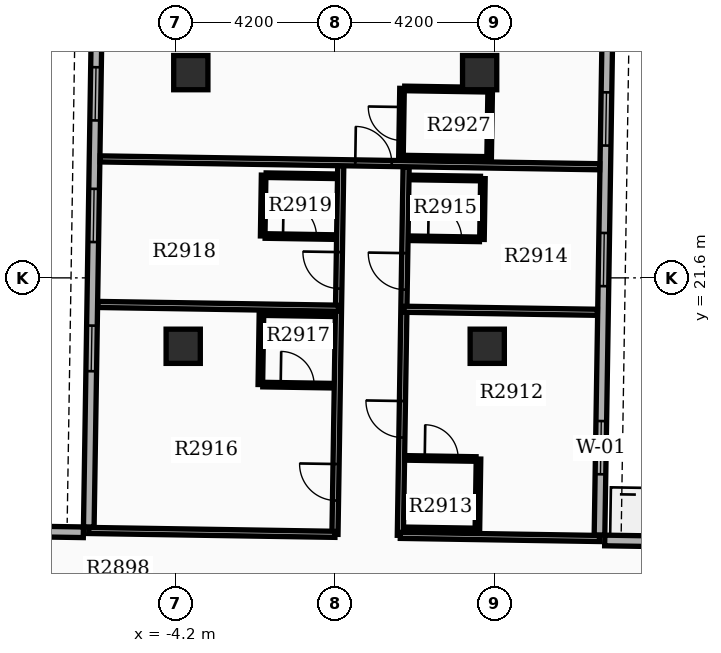
"""IFC4 building model, lengths in metres.
Left out: names, types, materials, properties, quantities, classifications, styles, units other than length and angle.
Written with IfcOpenShell. Run it as: python <this file> out.ifc"""

import sys

from ifc_helpers import new_model, si_unit, direction, frame, frame_2d, origin, origin_2d, place, context, subcontext, project, spatial, rectangle, extrude, element, fill, save


model = new_model("IFC4")
c1 = context("Model", 3, precision=1e-05, world=origin(), true_north=direction((0.0, 1.0)))
c2 = subcontext(c1, "Body", "Model", "MODEL_VIEW")
j1 = project(units=[si_unit("LENGTHUNIT", "METRE"), si_unit("PLANEANGLEUNIT", "RADIAN")], contexts=[c1])
p1 = place(None, origin())
s1 = spatial("IfcSite", under=j1, at=p1, CompositionType="ELEMENT")
p2 = place(p1, origin())
s2 = spatial("IfcBuilding", under=s1, at=p2, CompositionType="ELEMENT")
p3 = place(p2, frame((0.0, 0.0, 180.0)))
s3 = spatial("IfcBuildingStorey", under=s2, at=p3, CompositionType="ELEMENT", Elevation=180.0)
for number, where, z_axis, x_axis in (
    (1, (-4.0, 19.8, 0.0), (0.0, 0.0, 1.0), (1.0, 0.0, 0.0)),
    (2, (4.0, 19.8, 0.0), (0.0, 0.0, 1.0), (1.0, 0.0, 0.0)),
    (3, (-3.8, 27.0, 0.0), (0.0, 0.0, 1.0), (1.0, 0.0, 0.0)),
    (4, (3.8, 27.0, 0.0), (0.0, 0.0, 1.0), (1.0, 0.0, 0.0)),
):
    element("IfcColumn", number, at=place(p3, frame(where, z_axis=z_axis, x_axis=x_axis)), inside=s3, PredefinedType="COLUMN", context=c2, shape_type="SweptSolid", body=[
        extrude(rectangle(XDim=0.9, YDim=0.9, at=origin_2d()), origin(), (0.0, 0.0, 1.0), 3.9),
    ])
p4 = place(p3, frame((6.954, 14.833, 0.0), z_axis=(0.0, 0.0, 1.0), x_axis=(0.015705059908, 0.999876667941, 0.0)))
e5 = element("IfcWall", 5, at=p4, inside=s3, PredefinedType="STANDARD", context=c2, shape_type="SweptSolid", body=[
    extrude(rectangle(XDim=20.1, YDim=0.28, at=frame_2d((10.05, 0.0))), origin(), (0.0, 0.0, 1.0), 2.97),
])
p5 = place(p4, frame((1.6, 0.0, 0.8)))
e6 = element("IfcOpeningElement", 6, at=p5, cuts=e5, PredefinedType="OPENING", context=c2, shape_type="SweptSolid", body=[
    extrude(rectangle(XDim=1.4, YDim=1.6, at=frame_2d((0.7, 0.8))), frame((0.0, 0.15, 0.0), z_axis=(0.0, -1.0, 0.0), x_axis=(1.0, 0.0, 0.0)), (0.0, 0.0, 1.0), 0.3),
])
p6 = place(p4, frame((6.55, 0.0, 0.8)))
e7 = element("IfcOpeningElement", 7, at=p6, cuts=e5, PredefinedType="OPENING", context=c2, shape_type="SweptSolid", body=[
    extrude(rectangle(XDim=1.4, YDim=1.6, at=frame_2d((0.7, 0.8))), frame((0.0, 0.15, 0.0), z_axis=(0.0, -1.0, 0.0), x_axis=(1.0, 0.0, 0.0)), (0.0, 0.0, 1.0), 0.3),
])
p7 = place(p4, frame((10.25, 0.0, 0.8)))
e8 = element("IfcOpeningElement", 8, at=p7, cuts=e5, PredefinedType="OPENING", context=c2, shape_type="SweptSolid", body=[
    extrude(rectangle(XDim=1.4, YDim=1.6, at=frame_2d((0.7, 0.8))), frame((0.0, 0.15, 0.0), z_axis=(0.0, -1.0, 0.0), x_axis=(1.0, 0.0, 0.0)), (0.0, 0.0, 1.0), 0.3),
])
p8 = place(p4, frame((13.45, 0.0, 0.8)))
e9 = element("IfcOpeningElement", 9, at=p8, cuts=e5, PredefinedType="OPENING", context=c2, shape_type="SweptSolid", body=[
    extrude(rectangle(XDim=1.4, YDim=1.6, at=frame_2d((0.7, 0.8))), frame((0.0, 0.15, 0.0), z_axis=(0.0, -1.0, 0.0), x_axis=(1.0, 0.0, 0.0)), (0.0, 0.0, 1.0), 0.3),
])
p9 = place(p3, frame((-6.169, 35.141, 0.0), z_axis=(0.0, 0.0, 1.0), x_axis=(-0.01571739401, -0.999876474133, 0.0)))
e10 = element("IfcWall", 10, at=p9, inside=s3, PredefinedType="STANDARD", context=c2, shape_type="SweptSolid", body=[
    extrude(rectangle(XDim=20.1, YDim=0.28, at=frame_2d((10.05, 0.0))), origin(), (0.0, 0.0, 1.0), 2.97),
])
p10 = place(p9, frame((1.6, 0.0, 0.8)))
e11 = element("IfcOpeningElement", 11, at=p10, cuts=e10, PredefinedType="OPENING", context=c2, shape_type="SweptSolid", body=[
    extrude(rectangle(XDim=1.4, YDim=1.6, at=frame_2d((0.7, 0.8))), frame((0.0, 0.15, 0.0), z_axis=(0.0, -1.0, 0.0), x_axis=(1.0, 0.0, 0.0)), (0.0, 0.0, 1.0), 0.3),
])
p11 = place(p9, frame((4.8, 0.0, 0.8)))
e12 = element("IfcOpeningElement", 12, at=p11, cuts=e10, PredefinedType="OPENING", context=c2, shape_type="SweptSolid", body=[
    extrude(rectangle(XDim=1.4, YDim=1.6, at=frame_2d((0.7, 0.8))), frame((0.0, 0.15, 0.0), z_axis=(0.0, -1.0, 0.0), x_axis=(1.0, 0.0, 0.0)), (0.0, 0.0, 1.0), 0.3),
])
p12 = place(p9, frame((8.0, 0.0, 0.8)))
e13 = element("IfcOpeningElement", 13, at=p12, cuts=e10, PredefinedType="OPENING", context=c2, shape_type="SweptSolid", body=[
    extrude(rectangle(XDim=1.4, YDim=1.6, at=frame_2d((0.7, 0.8))), frame((0.0, 0.15, 0.0), z_axis=(0.0, -1.0, 0.0), x_axis=(1.0, 0.0, 0.0)), (0.0, 0.0, 1.0), 0.3),
])
p13 = place(p9, frame((11.2, 0.0, 0.8)))
e14 = element("IfcOpeningElement", 14, at=p13, cuts=e10, PredefinedType="OPENING", context=c2, shape_type="SweptSolid", body=[
    extrude(rectangle(XDim=1.4, YDim=1.6, at=frame_2d((0.7, 0.8))), frame((0.0, 0.15, 0.0), z_axis=(0.0, -1.0, 0.0), x_axis=(1.0, 0.0, 0.0)), (0.0, 0.0, 1.0), 0.3),
])
p14 = place(p9, frame((14.799, 0.0, 0.85)))
e15 = element("IfcOpeningElement", 15, at=p14, cuts=e10, PredefinedType="OPENING", context=c2, shape_type="SweptSolid", body=[
    extrude(rectangle(XDim=1.2, YDim=1.6, at=frame_2d((0.6, 0.8))), frame((0.0, 0.15, 0.0), z_axis=(0.0, -1.0, 0.0), x_axis=(1.0, 0.0, 0.0)), (0.0, 0.0, 1.0), 0.3),
])
p15 = place(p3, frame((13.391, 14.592, 0.0), z_axis=(0.0, 0.0, 1.0), x_axis=(-0.999876833368, 0.015694524359, 0.0)))
e16 = element("IfcWall", 16, at=p15, inside=s3, PredefinedType="STANDARD", context=c2, shape_type="SweptSolid", body=[
    extrude(rectangle(XDim=6.3, YDim=0.28, at=frame_2d((3.15, 0.0))), origin(), (0.0, 0.0, 1.0), 2.97),
])
p16 = place(p3, frame((-12.926, 15.005, 0.0), z_axis=(0.0, 0.0, 1.0), x_axis=(0.999876823822, -0.015695132501, 0.0)))
e17 = element("IfcWall", 17, at=p16, inside=s3, PredefinedType="STANDARD", context=c2, shape_type="SweptSolid", body=[
    extrude(rectangle(XDim=6.3, YDim=0.28, at=frame_2d((3.15, 0.0))), origin(), (0.0, 0.0, 1.0), 2.97),
])
p17 = place(p3, frame((1.713, 14.825, 0.0), z_axis=(0.0, 0.0, 1.0), x_axis=(0.015705659641, 0.999876658521, 0.0)))
e18 = element("IfcWall", 18, at=p17, inside=s3, PredefinedType="PARTITIONING", context=c2, shape_type="SweptSolid", body=[
    extrude(rectangle(XDim=9.7, YDim=0.16, at=frame_2d((4.85, 0.0))), origin(), (0.0, 0.0, 1.0), 2.96),
])
p18 = place(p17, frame((2.575, 0.0, 0.0)))
e19 = element("IfcOpeningElement", 19, at=p18, cuts=e18, PredefinedType="OPENING", context=c2, shape_type="SweptSolid", body=[
    extrude(rectangle(XDim=0.96, YDim=2.15, at=frame_2d((0.48, 1.075))), frame((0.0, 0.09, 0.0), z_axis=(0.0, -1.0, 0.0), x_axis=(1.0, 0.0, 0.0)), (0.0, 0.0, 1.0), 0.18),
])
p19 = place(p17, frame((6.467, 0.0, 0.0)))
e20 = element("IfcOpeningElement", 20, at=p19, cuts=e18, PredefinedType="OPENING", context=c2, shape_type="SweptSolid", body=[
    extrude(rectangle(XDim=0.96, YDim=2.15, at=frame_2d((0.48, 1.075))), frame((0.0, 0.09, 0.0), z_axis=(0.0, -1.0, 0.0), x_axis=(1.0, 0.0, 0.0)), (0.0, 0.0, 1.0), 0.18),
])
p20 = place(p3, frame((1.713, 14.825, 0.0), z_axis=(0.0, 0.0, 1.0), x_axis=(0.99987672073, -0.015701698737, 0.0)))
e21 = element("IfcWall", 21, at=p20, inside=s3, PredefinedType="PARTITIONING", context=c2, shape_type="SweptSolid", body=[
    extrude(rectangle(XDim=5.24, YDim=0.16, at=frame_2d((2.62, 0.0))), origin(), (0.0, 0.0, 1.0), 2.96),
])
p21 = place(p3, frame((1.806, 20.774, 0.0), z_axis=(0.0, 0.0, 1.0), x_axis=(0.999876343559, -0.015725698427, 0.0)))
e22 = element("IfcWall", 22, at=p21, inside=s3, PredefinedType="PARTITIONING", context=c2, shape_type="SweptSolid", body=[
    extrude(rectangle(XDim=5.092, YDim=0.16, at=frame_2d((2.546, 0.0))), origin(), (0.0, 0.0, 1.0), 2.96),
])
p22 = place(p3, frame((1.885, 16.863, 0.0), z_axis=(0.0, 0.0, 1.0), x_axis=(0.999876836305, -0.015694337248, 0.0)))
e23 = element("IfcWall", 23, at=p22, inside=s3, PredefinedType="PARTITIONING", context=c2, shape_type="SweptSolid", body=[
    extrude(rectangle(XDim=1.82, YDim=0.12, at=frame_2d((0.91, 0.0))), origin(), (0.0, 0.0, 1.0), 2.96),
])
p23 = place(p22, frame((0.47, 0.0, 0.0)))
e24 = element("IfcOpeningElement", 24, at=p23, cuts=e23, PredefinedType="OPENING", context=c2, shape_type="SweptSolid", body=[
    extrude(rectangle(XDim=0.88, YDim=2.1, at=frame_2d((0.44, 1.05))), frame((0.0, 0.07, 0.0), z_axis=(0.0, -1.0, 0.0), x_axis=(1.0, 0.0, 0.0)), (0.0, 0.0, 1.0), 0.14),
])
p24 = place(p3, frame((1.856, 14.983, 0.0), z_axis=(0.0, 0.0, 1.0), x_axis=(0.999876803258, -0.015696442504, 0.0)))
e25 = element("IfcWall", 25, at=p24, inside=s3, PredefinedType="PARTITIONING", context=c2, shape_type="SweptSolid", body=[
    extrude(rectangle(XDim=1.82, YDim=0.12, at=frame_2d((0.91, 0.0))), origin(), (0.0, 0.0, 1.0), 2.96),
])
p25 = place(p3, frame((3.74, 14.953, 0.0), z_axis=(0.0, 0.0, 1.0), x_axis=(0.015842167482, 0.99987450499, 0.0)))
e26 = element("IfcWall", 26, at=p25, inside=s3, PredefinedType="PARTITIONING", context=c2, shape_type="SweptSolid", body=[
    extrude(rectangle(XDim=1.88, YDim=0.12, at=frame_2d((0.94, 0.0))), origin(), (0.0, 0.0, 1.0), 2.96),
])
p26 = place(p3, frame((1.976, 22.642, 0.0), z_axis=(0.0, 0.0, 1.0), x_axis=(0.999876836305, -0.015694337248, 0.0)))
e27 = element("IfcWall", 27, at=p26, inside=s3, PredefinedType="PARTITIONING", context=c2, shape_type="SweptSolid", body=[
    extrude(rectangle(XDim=1.82, YDim=0.12, at=frame_2d((0.91, 0.0))), origin(), (0.0, 0.0, 1.0), 2.96),
])
p27 = place(p26, frame((0.47, 0.0, 0.0)))
e28 = element("IfcOpeningElement", 28, at=p27, cuts=e27, PredefinedType="OPENING", context=c2, shape_type="SweptSolid", body=[
    extrude(rectangle(XDim=0.88, YDim=2.1, at=frame_2d((0.44, 1.05))), frame((0.0, 0.07, 0.0), z_axis=(0.0, -1.0, 0.0), x_axis=(1.0, 0.0, 0.0)), (0.0, 0.0, 1.0), 0.14),
])
p28 = place(p3, frame((2.001, 24.242, 0.0), z_axis=(0.0, 0.0, 1.0), x_axis=(0.999874722342, -0.015828443418, 0.0)))
e29 = element("IfcWall", 29, at=p28, inside=s3, PredefinedType="PARTITIONING", context=c2, shape_type="SweptSolid", body=[
    extrude(rectangle(XDim=1.82, YDim=0.12, at=frame_2d((0.91, 0.0))), origin(), (0.0, 0.0, 1.0), 2.96),
])
p29 = place(p3, frame((3.861, 22.612, 0.0), z_axis=(0.0, 0.0, 1.0), x_axis=(0.015716050513, 0.999876495251, 0.0)))
e30 = element("IfcWall", 30, at=p29, inside=s3, PredefinedType="PARTITIONING", context=c2, shape_type="SweptSolid", body=[
    extrude(rectangle(XDim=1.6, YDim=0.12, at=frame_2d((0.8, 0.0))), origin(), (0.0, 0.0, 1.0), 2.96),
])
p30 = place(p3, frame((-0.007, 14.852, 0.0), z_axis=(0.0, 0.0, 1.0), x_axis=(0.015680101899, 0.999877059645, 0.0)))
e31 = element("IfcWall", 31, at=p30, inside=s3, PredefinedType="PARTITIONING", context=c2, shape_type="SweptSolid", body=[
    extrude(rectangle(XDim=9.7, YDim=0.16, at=frame_2d((4.85, 0.0))), origin(), (0.0, 0.0, 1.0), 2.96),
])
p31 = place(p30, frame((0.89, 0.0, 0.0)))
e32 = element("IfcOpeningElement", 32, at=p31, cuts=e31, PredefinedType="OPENING", context=c2, shape_type="SweptSolid", body=[
    extrude(rectangle(XDim=0.96, YDim=2.15, at=frame_2d((0.48, 1.075))), frame((0.0, 0.09, 0.0), z_axis=(0.0, -1.0, 0.0), x_axis=(1.0, 0.0, 0.0)), (0.0, 0.0, 1.0), 0.18),
])
p32 = place(p30, frame((6.467, 0.0, 0.0)))
e33 = element("IfcOpeningElement", 33, at=p32, cuts=e31, PredefinedType="OPENING", context=c2, shape_type="SweptSolid", body=[
    extrude(rectangle(XDim=0.96, YDim=2.15, at=frame_2d((0.48, 1.075))), frame((0.0, 0.09, 0.0), z_axis=(0.0, -1.0, 0.0), x_axis=(1.0, 0.0, 0.0)), (0.0, 0.0, 1.0), 0.18),
])
p33 = place(p3, frame((-0.007, 14.852, 0.0), z_axis=(0.0, 0.0, 1.0), x_axis=(-0.999876577995, 0.015710785373, 0.0)))
e34 = element("IfcWall", 34, at=p33, inside=s3, PredefinedType="PARTITIONING", context=c2, shape_type="SweptSolid", body=[
    extrude(rectangle(XDim=6.48, YDim=0.16, at=frame_2d((3.24, 0.0))), origin(), (0.0, 0.0, 1.0), 2.96),
])
p34 = place(p3, frame((0.087, 20.801, 0.0), z_axis=(0.0, 0.0, 1.0), x_axis=(-0.999876857896, 0.015692961637, 0.0)))
e35 = element("IfcWall", 35, at=p34, inside=s3, PredefinedType="PARTITIONING", context=c2, shape_type="SweptSolid", body=[
    extrude(rectangle(XDim=6.332, YDim=0.16, at=frame_2d((3.166, 0.0))), origin(), (0.0, 0.0, 1.0), 2.96),
])
p35 = place(p3, frame((-1.905, 18.792, 0.0), z_axis=(0.0, 0.0, 1.0), x_axis=(0.999876836305, -0.015694337248, 0.0)))
e36 = element("IfcWall", 36, at=p35, inside=s3, PredefinedType="PARTITIONING", context=c2, shape_type="SweptSolid", body=[
    extrude(rectangle(XDim=1.82, YDim=0.12, at=frame_2d((0.91, 0.0))), origin(), (0.0, 0.0, 1.0), 2.96),
])
p36 = place(p35, frame((0.47, 0.0, 0.0)))
e37 = element("IfcOpeningElement", 37, at=p36, cuts=e36, PredefinedType="OPENING", context=c2, shape_type="SweptSolid", body=[
    extrude(rectangle(XDim=0.88, YDim=2.1, at=frame_2d((0.44, 1.05))), frame((0.0, 0.07, 0.0), z_axis=(0.0, -1.0, 0.0), x_axis=(1.0, 0.0, 0.0)), (0.0, 0.0, 1.0), 0.14),
])
p37 = place(p3, frame((-1.875, 20.672, 0.0), z_axis=(0.0, 0.0, 1.0), x_axis=(0.999874688728, -0.015830566654, 0.0)))
e38 = element("IfcWall", 38, at=p37, inside=s3, PredefinedType="PARTITIONING", context=c2, shape_type="SweptSolid", body=[
    extrude(rectangle(XDim=1.82, YDim=0.12, at=frame_2d((0.91, 0.0))), origin(), (0.0, 0.0, 1.0), 2.96),
])
p38 = place(p3, frame((-1.97, 18.793, 0.0), z_axis=(0.0, 0.0, 1.0), x_axis=(0.015842167482, 0.99987450499, 0.0)))
e39 = element("IfcWall", 39, at=p38, inside=s3, PredefinedType="PARTITIONING", context=c2, shape_type="SweptSolid", body=[
    extrude(rectangle(XDim=1.88, YDim=0.12, at=frame_2d((0.94, 0.0))), origin(), (0.0, 0.0, 1.0), 2.96),
])
p39 = place(p3, frame((-1.844, 22.702, 0.0), z_axis=(0.0, 0.0, 1.0), x_axis=(0.999874688728, -0.015830566654, 0.0)))
e40 = element("IfcWall", 40, at=p39, inside=s3, PredefinedType="PARTITIONING", context=c2, shape_type="SweptSolid", body=[
    extrude(rectangle(XDim=1.82, YDim=0.12, at=frame_2d((0.91, 0.0))), origin(), (0.0, 0.0, 1.0), 2.96),
])
p40 = place(p39, frame((0.47, 0.0, 0.0)))
e41 = element("IfcOpeningElement", 41, at=p40, cuts=e40, PredefinedType="OPENING", context=c2, shape_type="SweptSolid", body=[
    extrude(rectangle(XDim=0.88, YDim=2.1, at=frame_2d((0.44, 1.05))), frame((0.0, 0.07, 0.0), z_axis=(0.0, -1.0, 0.0), x_axis=(1.0, 0.0, 0.0)), (0.0, 0.0, 1.0), 0.14),
])
p41 = place(p3, frame((-1.819, 24.302, 0.0), z_axis=(0.0, 0.0, 1.0), x_axis=(0.999876836305, -0.015694337248, 0.0)))
e42 = element("IfcWall", 42, at=p41, inside=s3, PredefinedType="PARTITIONING", context=c2, shape_type="SweptSolid", body=[
    extrude(rectangle(XDim=1.82, YDim=0.12, at=frame_2d((0.91, 0.0))), origin(), (0.0, 0.0, 1.0), 2.96),
])
p42 = place(p3, frame((-1.909, 22.703, 0.0), z_axis=(0.0, 0.0, 1.0), x_axis=(0.015718448585, 0.999876457556, 0.0)))
e43 = element("IfcWall", 43, at=p42, inside=s3, PredefinedType="PARTITIONING", context=c2, shape_type="SweptSolid", body=[
    extrude(rectangle(XDim=1.6, YDim=0.12, at=frame_2d((0.8, 0.0))), origin(), (0.0, 0.0, 1.0), 2.96),
])
p43 = place(p3, frame((-6.184, 24.73, 0.0), z_axis=(0.0, 0.0, 1.0), x_axis=(0.999876528878, -0.015713911007, 0.0)))
e44 = element("IfcWall", 44, at=p43, inside=s3, PredefinedType="PARTITIONING", context=c2, shape_type="SweptSolid", body=[
    extrude(rectangle(XDim=13.144, YDim=0.16, at=frame_2d((6.572, 0.0))), origin(), (0.0, 0.0, 1.0), 2.96),
])
p44 = place(p43, frame((6.712, 0.0, 0.0)))
e45 = element("IfcOpeningElement", 45, at=p44, cuts=e44, PredefinedType="OPENING", context=c2, shape_type="SweptSolid", body=[
    extrude(rectangle(XDim=0.96, YDim=2.15, at=frame_2d((0.48, 1.075))), frame((0.0, 0.09, 0.0), z_axis=(0.0, -1.0, 0.0), x_axis=(1.0, 0.0, 0.0)), (0.0, 0.0, 1.0), 0.18),
])
p45 = place(p3, frame((1.729, 24.766, 0.0), z_axis=(0.0, 0.0, 1.0), x_axis=(0.015694337248, 0.999876836305, 0.0)))
e46 = element("IfcWall", 46, at=p45, inside=s3, PredefinedType="PARTITIONING", context=c2, shape_type="SweptSolid", body=[
    extrude(rectangle(XDim=1.82, YDim=0.12, at=frame_2d((0.91, 0.0))), origin(), (0.0, 0.0, 1.0), 2.96),
])
p46 = place(p45, frame((0.45, 0.0, 0.0)))
e47 = element("IfcOpeningElement", 47, at=p46, cuts=e46, PredefinedType="OPENING", context=c2, shape_type="SweptSolid", body=[
    extrude(rectangle(XDim=0.88, YDim=2.1, at=frame_2d((0.44, 1.05))), frame((0.0, 0.07, 0.0), z_axis=(0.0, -1.0, 0.0), x_axis=(1.0, 0.0, 0.0)), (0.0, 0.0, 1.0), 0.14),
])
p47 = place(p3, frame((4.049, 24.729, 0.0), z_axis=(0.0, 0.0, 1.0), x_axis=(0.015694337248, 0.999876836305, 0.0)))
e48 = element("IfcWall", 48, at=p47, inside=s3, PredefinedType="PARTITIONING", context=c2, shape_type="SweptSolid", body=[
    extrude(rectangle(XDim=1.82, YDim=0.12, at=frame_2d((0.91, 0.0))), origin(), (0.0, 0.0, 1.0), 2.96),
])
for number, where, z_axis, x_axis in (
    (49, (1.799, 24.765, 0.0), (0.0, 0.0, 1.0), (1.0, -0.016, 0.0)),
    (50, (1.828, 26.585, 0.0), (0.0, 0.0, 1.0), (1.0, -0.016, 0.0)),
):
    element("IfcWall", number, at=place(p3, frame(where, z_axis=z_axis, x_axis=x_axis)), inside=s3, PredefinedType="PARTITIONING", context=c2, shape_type="SweptSolid", body=[
        extrude(rectangle(XDim=2.18, YDim=0.12, at=frame_2d((1.09, 0.0))), origin(), (0.0, 0.0, 1.0), 2.96),
    ])
p48 = place(p5, origin())
e51 = element("IfcWindow", 51, at=p48, inside=s3, PartitioningType="SINGLE_PANEL", PredefinedType="WINDOW", context=c2, shape_type="SweptSolid", body=[
    extrude(rectangle(XDim=1.4, YDim=1.6, at=frame_2d((0.7, 0.8))), frame((0.0, 0.03, 0.0), z_axis=(0.0, -1.0, 0.0), x_axis=(1.0, 0.0, 0.0)), (0.0, 0.0, 1.0), 0.06),
])
fill(e6, e51)
p49 = place(p6, origin())
e52 = element("IfcWindow", 52, at=p49, inside=s3, PartitioningType="SINGLE_PANEL", PredefinedType="WINDOW", context=c2, shape_type="SweptSolid", body=[
    extrude(rectangle(XDim=1.4, YDim=1.6, at=frame_2d((0.7, 0.8))), frame((0.0, 0.03, 0.0), z_axis=(0.0, -1.0, 0.0), x_axis=(1.0, 0.0, 0.0)), (0.0, 0.0, 1.0), 0.06),
])
fill(e7, e52)
p50 = place(p7, origin())
e53 = element("IfcWindow", 53, at=p50, inside=s3, PartitioningType="SINGLE_PANEL", PredefinedType="WINDOW", context=c2, shape_type="SweptSolid", body=[
    extrude(rectangle(XDim=1.4, YDim=1.6, at=frame_2d((0.7, 0.8))), frame((0.0, 0.03, 0.0), z_axis=(0.0, -1.0, 0.0), x_axis=(1.0, 0.0, 0.0)), (0.0, 0.0, 1.0), 0.06),
])
fill(e8, e53)
p51 = place(p12, origin())
e54 = element("IfcWindow", 54, at=p51, inside=s3, PartitioningType="SINGLE_PANEL", PredefinedType="WINDOW", context=c2, shape_type="SweptSolid", body=[
    extrude(rectangle(XDim=1.4, YDim=1.6, at=frame_2d((0.7, 0.8))), frame((0.0, 0.03, 0.0), z_axis=(0.0, -1.0, 0.0), x_axis=(1.0, 0.0, 0.0)), (0.0, 0.0, 1.0), 0.06),
])
fill(e13, e54)
p52 = place(p13, origin())
e55 = element("IfcWindow", 55, at=p52, inside=s3, PartitioningType="SINGLE_PANEL", PredefinedType="WINDOW", context=c2, shape_type="SweptSolid", body=[
    extrude(rectangle(XDim=1.4, YDim=1.6, at=frame_2d((0.7, 0.8))), frame((0.0, 0.03, 0.0), z_axis=(0.0, -1.0, 0.0), x_axis=(1.0, 0.0, 0.0)), (0.0, 0.0, 1.0), 0.06),
])
fill(e14, e55)
p53 = place(p14, origin())
e56 = element("IfcWindow", 56, at=p53, inside=s3, PartitioningType="SINGLE_PANEL", PredefinedType="WINDOW", context=c2, shape_type="SweptSolid", body=[
    extrude(rectangle(XDim=1.2, YDim=1.6, at=frame_2d((0.6, 0.8))), frame((0.0, 0.03, 0.0), z_axis=(0.0, -1.0, 0.0), x_axis=(1.0, 0.0, 0.0)), (0.0, 0.0, 1.0), 0.06),
])
fill(e15, e56)
p54 = place(p18, origin())
e57 = element("IfcDoor", 57, at=p54, inside=s3, OperationType="SINGLE_SWING_RIGHT", PredefinedType="DOOR", context=c2, shape_type="SweptSolid", body=[
    extrude(rectangle(XDim=0.96, YDim=2.15, at=frame_2d((0.48, 1.075))), frame((0.0, 0.025, 0.0), z_axis=(0.0, -1.0, 0.0), x_axis=(1.0, 0.0, 0.0)), (0.0, 0.0, 1.0), 0.05),
])
fill(e19, e57)
p55 = place(p23, origin())
e58 = element("IfcDoor", 58, at=p55, inside=s3, OperationType="SINGLE_SWING_LEFT", PredefinedType="DOOR", context=c2, shape_type="SweptSolid", body=[
    extrude(rectangle(XDim=0.88, YDim=2.1, at=frame_2d((0.44, 1.05))), frame((0.0, 0.025, 0.0), z_axis=(0.0, -1.0, 0.0), x_axis=(1.0, 0.0, 0.0)), (0.0, 0.0, 1.0), 0.05),
])
fill(e24, e58)
p56 = place(p19, origin())
e59 = element("IfcDoor", 59, at=p56, inside=s3, OperationType="SINGLE_SWING_RIGHT", PredefinedType="DOOR", context=c2, shape_type="SweptSolid", body=[
    extrude(rectangle(XDim=0.96, YDim=2.15, at=frame_2d((0.48, 1.075))), frame((0.0, 0.025, 0.0), z_axis=(0.0, -1.0, 0.0), x_axis=(1.0, 0.0, 0.0)), (0.0, 0.0, 1.0), 0.05),
])
fill(e20, e59)
p57 = place(p27, origin())
e60 = element("IfcDoor", 60, at=p57, inside=s3, OperationType="SINGLE_SWING_LEFT", PredefinedType="DOOR", context=c2, shape_type="SweptSolid", body=[
    extrude(rectangle(XDim=0.88, YDim=2.1, at=frame_2d((0.44, 1.05))), frame((0.0, 0.025, 0.0), z_axis=(0.0, -1.0, 0.0), x_axis=(1.0, 0.0, 0.0)), (0.0, 0.0, 1.0), 0.05),
])
fill(e28, e60)
p58 = place(p31, origin())
e61 = element("IfcDoor", 61, at=p58, inside=s3, OperationType="SINGLE_SWING_RIGHT", PredefinedType="DOOR", context=c2, shape_type="SweptSolid", body=[
    extrude(rectangle(XDim=0.96, YDim=2.15, at=frame_2d((0.48, 1.075))), frame((0.0, 0.025, 0.0), z_axis=(0.0, -1.0, 0.0), x_axis=(1.0, 0.0, 0.0)), (0.0, 0.0, 1.0), 0.05),
])
fill(e32, e61)
p59 = place(p36, origin())
e62 = element("IfcDoor", 62, at=p59, inside=s3, OperationType="SINGLE_SWING_LEFT", PredefinedType="DOOR", context=c2, shape_type="SweptSolid", body=[
    extrude(rectangle(XDim=0.88, YDim=2.1, at=frame_2d((0.44, 1.05))), frame((0.0, 0.025, 0.0), z_axis=(0.0, -1.0, 0.0), x_axis=(1.0, 0.0, 0.0)), (0.0, 0.0, 1.0), 0.05),
])
fill(e37, e62)
p60 = place(p32, origin())
e63 = element("IfcDoor", 63, at=p60, inside=s3, OperationType="SINGLE_SWING_RIGHT", PredefinedType="DOOR", context=c2, shape_type="SweptSolid", body=[
    extrude(rectangle(XDim=0.96, YDim=2.15, at=frame_2d((0.48, 1.075))), frame((0.0, 0.025, 0.0), z_axis=(0.0, -1.0, 0.0), x_axis=(1.0, 0.0, 0.0)), (0.0, 0.0, 1.0), 0.05),
])
fill(e33, e63)
p61 = place(p40, origin())
e64 = element("IfcDoor", 64, at=p61, inside=s3, OperationType="SINGLE_SWING_LEFT", PredefinedType="DOOR", context=c2, shape_type="SweptSolid", body=[
    extrude(rectangle(XDim=0.88, YDim=2.1, at=frame_2d((0.44, 1.05))), frame((0.0, 0.025, 0.0), z_axis=(0.0, -1.0, 0.0), x_axis=(1.0, 0.0, 0.0)), (0.0, 0.0, 1.0), 0.05),
])
fill(e41, e64)
p62 = place(p44, origin())
e65 = element("IfcDoor", 65, at=p62, inside=s3, OperationType="SINGLE_SWING_LEFT", PredefinedType="DOOR", context=c2, shape_type="SweptSolid", body=[
    extrude(rectangle(XDim=0.96, YDim=2.15, at=frame_2d((0.48, 1.075))), frame((0.0, 0.025, 0.0), z_axis=(0.0, -1.0, 0.0), x_axis=(1.0, 0.0, 0.0)), (0.0, 0.0, 1.0), 0.05),
])
fill(e45, e65)
p63 = place(p46, origin())
e66 = element("IfcDoor", 66, at=p63, inside=s3, OperationType="SINGLE_SWING_RIGHT", PredefinedType="DOOR", context=c2, shape_type="SweptSolid", body=[
    extrude(rectangle(XDim=0.88, YDim=2.1, at=frame_2d((0.44, 1.05))), frame((0.0, 0.025, 0.0), z_axis=(0.0, -1.0, 0.0), x_axis=(1.0, 0.0, 0.0)), (0.0, 0.0, 1.0), 0.05),
])
fill(e47, e66)
save(model, sys.argv[1])
